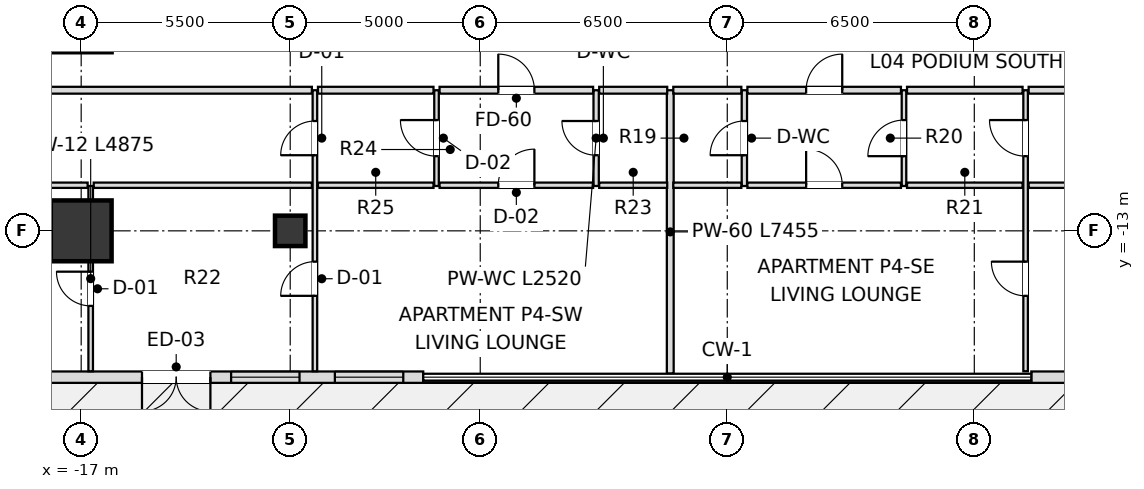
"""IFC4 building model, lengths in metres.
Left out: names, types, materials, properties, quantities, classifications, styles, units other than length and angle.
Written with IfcOpenShell. Run it as: python <this file> out.ifc"""

import sys

from ifc_helpers import new_model, si_unit, direction, frame, frame_2d, origin, origin_2d, place, context, subcontext, project, spatial, rectangle, extrude, element, fill, save


model = new_model("IFC4")
c1 = context("Model", 3, precision=1e-05, world=origin(), true_north=direction((0.0, 1.0)))
c2 = subcontext(c1, "Body", "Model", "MODEL_VIEW")
j1 = project(units=[si_unit("LENGTHUNIT", "METRE"), si_unit("PLANEANGLEUNIT", "RADIAN")], contexts=[c1])
p1 = place(None, origin())
s1 = spatial("IfcSite", under=j1, at=p1, CompositionType="ELEMENT")
p2 = place(p1, origin())
s2 = spatial("IfcBuilding", under=s1, at=p2, CompositionType="ELEMENT")
p3 = place(p2, frame((0.0, 0.0, 22.2)))
s3 = spatial("IfcBuildingStorey", under=s2, at=p3, CompositionType="ELEMENT", Elevation=22.2)
p4 = place(p3, frame((-17.0, -13.0, 0.0), z_axis=(0.0, 0.0, 1.0), x_axis=(1.0, 0.0, 0.0)))
e1 = element("IfcColumn", 1, at=p4, inside=s3, PredefinedType="USERDEFINED", context=c2, shape_type="SweptSolid", body=[
    extrude(rectangle(XDim=1.6, YDim=1.6, at=origin_2d()), origin(), (0.0, 0.0, 1.0), 5.4),
])
p5 = place(p3, frame((-11.5, -13.0, 0.0), z_axis=(0.0, 0.0, 1.0), x_axis=(1.0, 0.0, 0.0)))
e2 = element("IfcColumn", 2, at=p5, inside=s3, PredefinedType="COLUMN", context=c2, shape_type="SweptSolid", body=[
    extrude(rectangle(XDim=0.8, YDim=0.8, at=origin_2d()), origin(), (0.0, 0.0, 1.0), 5.4),
])
p6 = place(p3, frame((-8.0, -16.85, 0.0), z_axis=(0.0, 0.0, 1.0), x_axis=(-1.0, 0.0, 0.0)))
e3 = element("IfcWall", 3, at=p6, inside=s3, PredefinedType="SOLIDWALL", context=c2, shape_type="SweptSolid", body=[
    extrude(rectangle(XDim=14.85, YDim=0.3, at=frame_2d((7.425, 0.0))), origin(), (0.0, 0.0, 1.0), 4.356),
])
p7 = place(p6, frame((5.6, 0.0, 0.0)))
e4 = element("IfcOpeningElement", 4, at=p7, cuts=e3, PredefinedType="OPENING", context=c2, shape_type="SweptSolid", body=[
    extrude(rectangle(XDim=1.8, YDim=2.3, at=frame_2d((0.9, 1.15))), frame((0.0, 0.16, 0.0), z_axis=(0.0, -1.0, 0.0), x_axis=(1.0, 0.0, 0.0)), (0.0, 0.0, 1.0), 0.32),
])
p8 = place(p6, frame((0.525, 0.0, 0.72)))
e5 = element("IfcOpeningElement", 5, at=p8, cuts=e3, PredefinedType="OPENING", context=c2, shape_type="SweptSolid", body=[
    extrude(rectangle(XDim=1.8, YDim=1.68, at=frame_2d((0.9, 0.84))), frame((0.0, 0.16, 0.0), z_axis=(0.0, -1.0, 0.0), x_axis=(1.0, 0.0, 0.0)), (0.0, 0.0, 1.0), 0.32),
])
p9 = place(p6, frame((3.255, 0.0, 0.72)))
e6 = element("IfcOpeningElement", 6, at=p9, cuts=e3, PredefinedType="OPENING", context=c2, shape_type="SweptSolid", body=[
    extrude(rectangle(XDim=1.8, YDim=1.68, at=frame_2d((0.9, 0.84))), frame((0.0, 0.16, 0.0), z_axis=(0.0, -1.0, 0.0), x_axis=(1.0, 0.0, 0.0)), (0.0, 0.0, 1.0), 0.32),
])
p10 = place(p6, frame((10.535, 0.0, 0.8)))
e7 = element("IfcOpeningElement", 7, at=p10, cuts=e3, PredefinedType="OPENING", context=c2, shape_type="SweptSolid", body=[
    extrude(rectangle(XDim=2.4, YDim=2.2, at=frame_2d((1.2, 1.1))), frame((0.0, 0.16, 0.0), z_axis=(0.0, -1.0, 0.0), x_axis=(1.0, 0.0, 0.0)), (0.0, 0.0, 1.0), 0.32),
])
p11 = place(p3, frame((22.85, -16.85, 0.0), z_axis=(0.0, 0.0, 1.0), x_axis=(-1.0, 0.0, 0.0)))
e8 = element("IfcWall", 8, at=p11, inside=s3, PredefinedType="SOLIDWALL", context=c2, shape_type="SweptSolid", body=[
    extrude(rectangle(XDim=14.85, YDim=0.3, at=frame_2d((7.425, 0.0))), origin(), (0.0, 0.0, 1.0), 4.356),
])
p12 = place(p11, frame((1.425, 0.0, 0.8)))
e9 = element("IfcOpeningElement", 9, at=p12, cuts=e8, PredefinedType="OPENING", context=c2, shape_type="SweptSolid", body=[
    extrude(rectangle(XDim=2.4, YDim=2.2, at=frame_2d((1.2, 1.1))), frame((0.0, 0.16, 0.0), z_axis=(0.0, -1.0, 0.0), x_axis=(1.0, 0.0, 0.0)), (0.0, 0.0, 1.0), 0.32),
])
p13 = place(p11, frame((6.375, 0.0, 0.8)))
e10 = element("IfcOpeningElement", 10, at=p13, cuts=e8, PredefinedType="OPENING", context=c2, shape_type="SweptSolid", body=[
    extrude(rectangle(XDim=2.4, YDim=2.2, at=frame_2d((1.2, 1.1))), frame((0.0, 0.16, 0.0), z_axis=(0.0, -1.0, 0.0), x_axis=(1.0, 0.0, 0.0)), (0.0, 0.0, 1.0), 0.32),
])
p14 = place(p11, frame((11.25, 0.0, 0.8)))
e11 = element("IfcOpeningElement", 11, at=p14, cuts=e8, PredefinedType="OPENING", context=c2, shape_type="SweptSolid", body=[
    extrude(rectangle(XDim=2.4, YDim=2.2, at=frame_2d((1.2, 1.1))), frame((0.0, 0.16, 0.0), z_axis=(0.0, -1.0, 0.0), x_axis=(1.0, 0.0, 0.0)), (0.0, 0.0, 1.0), 0.32),
])
p15 = place(p3, frame((-16.75, -16.695, 0.0), z_axis=(0.0, 0.0, 1.0), x_axis=(0.0, 1.0, 0.0)))
e12 = element("IfcWall", 12, at=p15, inside=s3, PredefinedType="PARTITIONING", context=c2, shape_type="SweptSolid", body=[
    extrude(rectangle(XDim=4.875, YDim=0.12, at=frame_2d((2.438, 0.0))), origin(), (0.0, 0.0, 1.0), 2.985),
])
p16 = place(p15, frame((1.721, 0.0, 0.0)))
e13 = element("IfcOpeningElement", 13, at=p16, cuts=e12, PredefinedType="OPENING", context=c2, shape_type="SweptSolid", body=[
    extrude(rectangle(XDim=0.9, YDim=2.1, at=frame_2d((0.45, 1.05))), frame((0.0, 0.07, 0.0), z_axis=(0.0, -1.0, 0.0), x_axis=(1.0, 0.0, 0.0)), (0.0, 0.0, 1.0), 0.14),
])
p17 = place(p3, frame((-10.85, -16.695, 0.0), z_axis=(0.0, 0.0, 1.0), x_axis=(0.0, 1.0, 0.0)))
e14 = element("IfcWall", 14, at=p17, inside=s3, PredefinedType="PARTITIONING", context=c2, shape_type="SweptSolid", body=[
    extrude(rectangle(XDim=7.395, YDim=0.12, at=frame_2d((3.698, 0.0))), origin(), (0.0, 0.0, 1.0), 4.436),
])
p18 = place(p17, frame((5.685, 0.0, 0.0)))
e15 = element("IfcOpeningElement", 15, at=p18, cuts=e14, PredefinedType="OPENING", context=c2, shape_type="SweptSolid", body=[
    extrude(rectangle(XDim=0.9, YDim=2.1, at=frame_2d((0.45, 1.05))), frame((0.0, 0.07, 0.0), z_axis=(0.0, -1.0, 0.0), x_axis=(1.0, 0.0, 0.0)), (0.0, 0.0, 1.0), 0.14),
])
p19 = place(p17, frame((1.985, 0.0, 0.0)))
e16 = element("IfcOpeningElement", 16, at=p19, cuts=e14, PredefinedType="OPENING", context=c2, shape_type="SweptSolid", body=[
    extrude(rectangle(XDim=0.9, YDim=2.1, at=frame_2d((0.45, 1.05))), frame((0.0, 0.07, 0.0), z_axis=(0.0, -1.0, 0.0), x_axis=(1.0, 0.0, 0.0)), (0.0, 0.0, 1.0), 0.14),
])
p20 = place(p3, frame((-7.65, -11.82, 0.0), z_axis=(0.0, 0.0, 1.0), x_axis=(0.0, 1.0, 0.0)))
e17 = element("IfcWall", 17, at=p20, inside=s3, PredefinedType="PARTITIONING", context=c2, shape_type="SweptSolid", body=[
    extrude(rectangle(XDim=2.52, YDim=0.12, at=frame_2d((1.26, 0.0))), origin(), (0.0, 0.0, 1.0), 5.0),
])
p21 = place(p20, frame((0.785, 0.0, 0.0)))
e18 = element("IfcOpeningElement", 18, at=p21, cuts=e17, PredefinedType="OPENING", context=c2, shape_type="SweptSolid", body=[
    extrude(rectangle(XDim=0.95, YDim=2.1, at=frame_2d((0.475, 1.05))), frame((0.0, 0.07, 0.0), z_axis=(0.0, -1.0, 0.0), x_axis=(1.0, 0.0, 0.0)), (0.0, 0.0, 1.0), 0.14),
])
p22 = place(p3, frame((-3.45, -11.82, 0.0), z_axis=(0.0, 0.0, 1.0), x_axis=(0.0, 1.0, 0.0)))
e19 = element("IfcWall", 19, at=p22, inside=s3, PredefinedType="PARTITIONING", context=c2, shape_type="SweptSolid", body=[
    extrude(rectangle(XDim=2.52, YDim=0.14, at=frame_2d((1.26, 0.0))), origin(), (0.0, 0.0, 1.0), 5.0),
])
p23 = place(p22, frame((0.81, 0.0, 0.0)))
e20 = element("IfcOpeningElement", 20, at=p23, cuts=e19, PredefinedType="OPENING", context=c2, shape_type="SweptSolid", body=[
    extrude(rectangle(XDim=0.9, YDim=2.1, at=frame_2d((0.45, 1.05))), frame((0.0, 0.08, 0.0), z_axis=(0.0, -1.0, 0.0), x_axis=(1.0, 0.0, 0.0)), (0.0, 0.0, 1.0), 0.16),
])
p24 = place(p3, frame((-1.5, -16.755, 0.0), z_axis=(0.0, 0.0, 1.0), x_axis=(0.0, 1.0, 0.0)))
e21 = element("IfcWall", 21, at=p24, inside=s3, PredefinedType="PARTITIONING", context=c2, shape_type="SweptSolid", body=[
    extrude(rectangle(XDim=7.455, YDim=0.18, at=frame_2d((3.728, 0.0))), origin(), (0.0, 0.0, 1.0), 4.568),
])
p25 = place(p3, frame((0.45, -11.82, 0.0), z_axis=(0.0, 0.0, 1.0), x_axis=(0.0, 1.0, 0.0)))
e22 = element("IfcWall", 22, at=p25, inside=s3, PredefinedType="PARTITIONING", context=c2, shape_type="SweptSolid", body=[
    extrude(rectangle(XDim=2.52, YDim=0.14, at=frame_2d((1.26, 0.0))), origin(), (0.0, 0.0, 1.0), 5.0),
])
p26 = place(p25, frame((0.81, 0.0, 0.0)))
e23 = element("IfcOpeningElement", 23, at=p26, cuts=e22, PredefinedType="OPENING", context=c2, shape_type="SweptSolid", body=[
    extrude(rectangle(XDim=0.9, YDim=2.1, at=frame_2d((0.45, 1.05))), frame((0.0, 0.08, 0.0), z_axis=(0.0, -1.0, 0.0), x_axis=(1.0, 0.0, 0.0)), (0.0, 0.0, 1.0), 0.16),
])
p27 = place(p3, frame((4.65, -11.82, 0.0), z_axis=(0.0, 0.0, 1.0), x_axis=(0.0, 1.0, 0.0)))
e24 = element("IfcWall", 24, at=p27, inside=s3, PredefinedType="PARTITIONING", context=c2, shape_type="SweptSolid", body=[
    extrude(rectangle(XDim=2.52, YDim=0.12, at=frame_2d((1.26, 0.0))), origin(), (0.0, 0.0, 1.0), 5.0),
])
p28 = place(p27, frame((0.785, 0.0, 0.0)))
e25 = element("IfcOpeningElement", 25, at=p28, cuts=e24, PredefinedType="OPENING", context=c2, shape_type="SweptSolid", body=[
    extrude(rectangle(XDim=0.95, YDim=2.1, at=frame_2d((0.475, 1.05))), frame((0.0, 0.07, 0.0), z_axis=(0.0, -1.0, 0.0), x_axis=(1.0, 0.0, 0.0)), (0.0, 0.0, 1.0), 0.14),
])
p29 = place(p3, frame((7.85, -16.695, 0.0), z_axis=(0.0, 0.0, 1.0), x_axis=(0.0, 1.0, 0.0)))
e26 = element("IfcWall", 26, at=p29, inside=s3, PredefinedType="PARTITIONING", context=c2, shape_type="SweptSolid", body=[
    extrude(rectangle(XDim=7.395, YDim=0.12, at=frame_2d((3.698, 0.0))), origin(), (0.0, 0.0, 1.0), 4.436),
])
p30 = place(p29, frame((5.66, 0.0, 0.0)))
e27 = element("IfcOpeningElement", 27, at=p30, cuts=e26, PredefinedType="OPENING", context=c2, shape_type="SweptSolid", body=[
    extrude(rectangle(XDim=0.95, YDim=2.1, at=frame_2d((0.475, 1.05))), frame((0.0, 0.07, 0.0), z_axis=(0.0, -1.0, 0.0), x_axis=(1.0, 0.0, 0.0)), (0.0, 0.0, 1.0), 0.14),
])
p31 = place(p29, frame((1.985, 0.0, 0.0)))
e28 = element("IfcOpeningElement", 28, at=p31, cuts=e26, PredefinedType="OPENING", context=c2, shape_type="SweptSolid", body=[
    extrude(rectangle(XDim=0.9, YDim=2.1, at=frame_2d((0.45, 1.05))), frame((0.0, 0.07, 0.0), z_axis=(0.0, -1.0, 0.0), x_axis=(1.0, 0.0, 0.0)), (0.0, 0.0, 1.0), 0.14),
])
p32 = place(p3, frame((-22.695, -11.8, 0.0), z_axis=(0.0, 0.0, 1.0), x_axis=(1.0, 0.0, 0.0)))
e29 = element("IfcWall", 29, at=p32, inside=s3, PredefinedType="PARTITIONING", context=c2, shape_type="SweptSolid", body=[
    extrude(rectangle(XDim=5.865, YDim=0.14, at=frame_2d((2.933, 0.0))), origin(), (0.0, 0.0, 1.0), 4.356),
])
p33 = place(p3, frame((-16.67, -11.8, 0.0), z_axis=(0.0, 0.0, 1.0), x_axis=(1.0, 0.0, 0.0)))
e30 = element("IfcWall", 30, at=p33, inside=s3, PredefinedType="PARTITIONING", context=c2, shape_type="SweptSolid", body=[
    extrude(rectangle(XDim=5.74, YDim=0.14, at=frame_2d((2.87, 0.0))), origin(), (0.0, 0.0, 1.0), 5.0),
])
p34 = place(p3, frame((-10.77, -11.8, 0.0), z_axis=(0.0, 0.0, 1.0), x_axis=(1.0, 0.0, 0.0)))
e31 = element("IfcWall", 31, at=p34, inside=s3, PredefinedType="PARTITIONING", context=c2, shape_type="SweptSolid", body=[
    extrude(rectangle(XDim=3.04, YDim=0.14, at=frame_2d((1.52, 0.0))), origin(), (0.0, 0.0, 1.0), 5.0),
])
p35 = place(p3, frame((-7.57, -11.8, 0.0), z_axis=(0.0, 0.0, 1.0), x_axis=(1.0, 0.0, 0.0)))
e32 = element("IfcWall", 32, at=p35, inside=s3, PredefinedType="PARTITIONING", context=c2, shape_type="SweptSolid", body=[
    extrude(rectangle(XDim=4.04, YDim=0.14, at=frame_2d((2.02, 0.0))), origin(), (0.0, 0.0, 1.0), 4.436),
])
p36 = place(p35, frame((1.545, 0.0, 0.0)))
e33 = element("IfcOpeningElement", 33, at=p36, cuts=e32, PredefinedType="OPENING", context=c2, shape_type="SweptSolid", body=[
    extrude(rectangle(XDim=0.95, YDim=2.1, at=frame_2d((0.475, 1.05))), frame((0.0, 0.08, 0.0), z_axis=(0.0, -1.0, 0.0), x_axis=(1.0, 0.0, 0.0)), (0.0, 0.0, 1.0), 0.16),
])
for number, where, z_axis, x_axis in (
    (34, (-3.37, -11.8, 0.0), (0.0, 0.0, 1.0), (1.0, 0.0, 0.0)),
    (35, (-1.42, -11.8, 0.0), (0.0, 0.0, 1.0), (1.0, 0.0, 0.0)),
):
    element("IfcWall", number, at=place(p3, frame(where, z_axis=z_axis, x_axis=x_axis)), inside=s3, PredefinedType="PARTITIONING", context=c2, shape_type="SweptSolid", body=[
        extrude(rectangle(XDim=1.79, YDim=0.14, at=frame_2d((0.895, 0.0))), origin(), (0.0, 0.0, 1.0), 5.0),
    ])
p37 = place(p3, frame((0.53, -11.8, 0.0), z_axis=(0.0, 0.0, 1.0), x_axis=(1.0, 0.0, 0.0)))
e36 = element("IfcWall", 36, at=p37, inside=s3, PredefinedType="PARTITIONING", context=c2, shape_type="SweptSolid", body=[
    extrude(rectangle(XDim=4.04, YDim=0.14, at=frame_2d((2.02, 0.0))), origin(), (0.0, 0.0, 1.0), 5.0),
])
p38 = place(p37, frame((1.545, 0.0, 0.0)))
e37 = element("IfcOpeningElement", 37, at=p38, cuts=e36, PredefinedType="OPENING", context=c2, shape_type="SweptSolid", body=[
    extrude(rectangle(XDim=0.95, YDim=2.1, at=frame_2d((0.475, 1.05))), frame((0.0, 0.08, 0.0), z_axis=(0.0, -1.0, 0.0), x_axis=(1.0, 0.0, 0.0)), (0.0, 0.0, 1.0), 0.16),
])
p39 = place(p3, frame((4.73, -11.8, 0.0), z_axis=(0.0, 0.0, 1.0), x_axis=(1.0, 0.0, 0.0)))
e38 = element("IfcWall", 38, at=p39, inside=s3, PredefinedType="PARTITIONING", context=c2, shape_type="SweptSolid", body=[
    extrude(rectangle(XDim=3.04, YDim=0.14, at=frame_2d((1.52, 0.0))), origin(), (0.0, 0.0, 1.0), 4.436),
])
p40 = place(p3, frame((7.93, -11.8, 0.0), z_axis=(0.0, 0.0, 1.0), x_axis=(1.0, 0.0, 0.0)))
e39 = element("IfcWall", 39, at=p40, inside=s3, PredefinedType="PARTITIONING", context=c2, shape_type="SweptSolid", body=[
    extrude(rectangle(XDim=4.79, YDim=0.14, at=frame_2d((2.395, 0.0))), origin(), (0.0, 0.0, 1.0), 5.0),
])
p41 = place(p3, frame((-22.695, -9.3, 0.0), z_axis=(0.0, 0.0, 1.0), x_axis=(1.0, 0.0, 0.0)))
e40 = element("IfcWall", 40, at=p41, inside=s3, PredefinedType="PARTITIONING", context=c2, shape_type="SweptSolid", body=[
    extrude(rectangle(XDim=11.765, YDim=0.18, at=frame_2d((5.883, 0.0))), origin(), (0.0, 0.0, 1.0), 4.356),
])
p42 = place(p3, frame((-10.77, -9.3, 0.0), z_axis=(0.0, 0.0, 1.0), x_axis=(1.0, 0.0, 0.0)))
e41 = element("IfcWall", 41, at=p42, inside=s3, PredefinedType="PARTITIONING", context=c2, shape_type="SweptSolid", body=[
    extrude(rectangle(XDim=3.04, YDim=0.18, at=frame_2d((1.52, 0.0))), origin(), (0.0, 0.0, 1.0), 5.0),
])
p43 = place(p3, frame((-7.57, -9.3, 0.0), z_axis=(0.0, 0.0, 1.0), x_axis=(1.0, 0.0, 0.0)))
e42 = element("IfcWall", 42, at=p43, inside=s3, PredefinedType="PARTITIONING", context=c2, shape_type="SweptSolid", body=[
    extrude(rectangle(XDim=4.04, YDim=0.18, at=frame_2d((2.02, 0.0))), origin(), (0.0, 0.0, 1.0), 4.436),
])
p44 = place(p43, frame((1.545, 0.0, 0.0)))
e43 = element("IfcOpeningElement", 43, at=p44, cuts=e42, PredefinedType="OPENING", context=c2, shape_type="SweptSolid", body=[
    extrude(rectangle(XDim=0.95, YDim=2.15, at=frame_2d((0.475, 1.075))), frame((0.0, 0.1, 0.0), z_axis=(0.0, -1.0, 0.0), x_axis=(1.0, 0.0, 0.0)), (0.0, 0.0, 1.0), 0.2),
])
for number, where, z_axis, x_axis in (
    (44, (-3.37, -9.3, 0.0), (0.0, 0.0, 1.0), (1.0, 0.0, 0.0)),
    (45, (-1.42, -9.3, 0.0), (0.0, 0.0, 1.0), (1.0, 0.0, 0.0)),
):
    element("IfcWall", number, at=place(p3, frame(where, z_axis=z_axis, x_axis=x_axis)), inside=s3, PredefinedType="PARTITIONING", context=c2, shape_type="SweptSolid", body=[
        extrude(rectangle(XDim=1.79, YDim=0.18, at=frame_2d((0.895, 0.0))), origin(), (0.0, 0.0, 1.0), 5.0),
    ])
p45 = place(p3, frame((0.53, -9.3, 0.0), z_axis=(0.0, 0.0, 1.0), x_axis=(1.0, 0.0, 0.0)))
e46 = element("IfcWall", 46, at=p45, inside=s3, PredefinedType="PARTITIONING", context=c2, shape_type="SweptSolid", body=[
    extrude(rectangle(XDim=4.04, YDim=0.18, at=frame_2d((2.02, 0.0))), origin(), (0.0, 0.0, 1.0), 5.0),
])
p46 = place(p45, frame((1.545, 0.0, 0.0)))
e47 = element("IfcOpeningElement", 47, at=p46, cuts=e46, PredefinedType="OPENING", context=c2, shape_type="SweptSolid", body=[
    extrude(rectangle(XDim=0.95, YDim=2.15, at=frame_2d((0.475, 1.075))), frame((0.0, 0.1, 0.0), z_axis=(0.0, -1.0, 0.0), x_axis=(1.0, 0.0, 0.0)), (0.0, 0.0, 1.0), 0.2),
])
p47 = place(p3, frame((4.73, -9.3, 0.0), z_axis=(0.0, 0.0, 1.0), x_axis=(1.0, 0.0, 0.0)))
e48 = element("IfcWall", 48, at=p47, inside=s3, PredefinedType="PARTITIONING", context=c2, shape_type="SweptSolid", body=[
    extrude(rectangle(XDim=3.04, YDim=0.18, at=frame_2d((1.52, 0.0))), origin(), (0.0, 0.0, 1.0), 4.436),
])
p48 = place(p3, frame((7.93, -9.3, 0.0), z_axis=(0.0, 0.0, 1.0), x_axis=(1.0, 0.0, 0.0)))
e49 = element("IfcWall", 49, at=p48, inside=s3, PredefinedType="PARTITIONING", context=c2, shape_type="SweptSolid", body=[
    extrude(rectangle(XDim=14.765, YDim=0.18, at=frame_2d((7.383, 0.0))), origin(), (0.0, 0.0, 1.0), 4.356),
])
p49 = place(p7, origin())
e50 = element("IfcDoor", 50, at=p49, inside=s3, OperationType="DOUBLE_DOOR_SINGLE_SWING", PredefinedType="DOOR", context=c2, shape_type="SweptSolid", body=[
    extrude(rectangle(XDim=1.8, YDim=2.3, at=frame_2d((0.9, 1.15))), frame((0.0, 0.025, 0.0), z_axis=(0.0, -1.0, 0.0), x_axis=(1.0, 0.0, 0.0)), (0.0, 0.0, 1.0), 0.05),
])
fill(e4, e50)
p50 = place(p8, origin())
e51 = element("IfcWindow", 51, at=p50, inside=s3, PartitioningType="SINGLE_PANEL", PredefinedType="WINDOW", context=c2, shape_type="SweptSolid", body=[
    extrude(rectangle(XDim=1.8, YDim=1.68, at=frame_2d((0.9, 0.84))), frame((0.0, 0.03, 0.0), z_axis=(0.0, -1.0, 0.0), x_axis=(1.0, 0.0, 0.0)), (0.0, 0.0, 1.0), 0.06),
])
fill(e5, e51)
p51 = place(p9, origin())
e52 = element("IfcWindow", 52, at=p51, inside=s3, PartitioningType="SINGLE_PANEL", PredefinedType="WINDOW", context=c2, shape_type="SweptSolid", body=[
    extrude(rectangle(XDim=1.8, YDim=1.68, at=frame_2d((0.9, 0.84))), frame((0.0, 0.03, 0.0), z_axis=(0.0, -1.0, 0.0), x_axis=(1.0, 0.0, 0.0)), (0.0, 0.0, 1.0), 0.06),
])
fill(e6, e52)
p52 = place(p23, origin())
e53 = element("IfcDoor", 53, at=p52, inside=s3, OperationType="SINGLE_SWING_RIGHT", PredefinedType="DOOR", context=c2, shape_type="SweptSolid", body=[
    extrude(rectangle(XDim=0.9, YDim=2.1, at=frame_2d((0.45, 1.05))), frame((0.0, 0.025, 0.0), z_axis=(0.0, -1.0, 0.0), x_axis=(1.0, 0.0, 0.0)), (0.0, 0.0, 1.0), 0.05),
])
fill(e20, e53)
p53 = place(p44, origin())
e54 = element("IfcDoor", 54, at=p53, inside=s3, OperationType="SINGLE_SWING_LEFT", PredefinedType="DOOR", context=c2, shape_type="SweptSolid", body=[
    extrude(rectangle(XDim=0.95, YDim=2.15, at=frame_2d((0.475, 1.075))), frame((0.0, 0.025, 0.0), z_axis=(0.0, -1.0, 0.0), x_axis=(1.0, 0.0, 0.0)), (0.0, 0.0, 1.0), 0.05),
])
fill(e43, e54)
p54 = place(p21, origin())
e55 = element("IfcDoor", 55, at=p54, inside=s3, OperationType="SINGLE_SWING_RIGHT", PredefinedType="DOOR", context=c2, shape_type="SweptSolid", body=[
    extrude(rectangle(XDim=0.95, YDim=2.1, at=frame_2d((0.475, 1.05))), frame((0.0, 0.025, 0.0), z_axis=(0.0, -1.0, 0.0), x_axis=(1.0, 0.0, 0.0)), (0.0, 0.0, 1.0), 0.05),
])
fill(e18, e55)
p55 = place(p18, origin())
e56 = element("IfcDoor", 56, at=p55, inside=s3, OperationType="SINGLE_SWING_LEFT", PredefinedType="DOOR", context=c2, shape_type="SweptSolid", body=[
    extrude(rectangle(XDim=0.9, YDim=2.1, at=frame_2d((0.45, 1.05))), frame((0.0, 0.025, 0.0), z_axis=(0.0, -1.0, 0.0), x_axis=(1.0, 0.0, 0.0)), (0.0, 0.0, 1.0), 0.05),
])
fill(e15, e56)
p56 = place(p36, origin())
e57 = element("IfcDoor", 57, at=p56, inside=s3, OperationType="SINGLE_SWING_RIGHT", PredefinedType="DOOR", context=c2, shape_type="SweptSolid", body=[
    extrude(rectangle(XDim=0.95, YDim=2.1, at=frame_2d((0.475, 1.05))), frame((0.0, 0.025, 0.0), z_axis=(0.0, -1.0, 0.0), x_axis=(1.0, 0.0, 0.0)), (0.0, 0.0, 1.0), 0.05),
])
fill(e33, e57)
p57 = place(p19, origin())
e58 = element("IfcDoor", 58, at=p57, inside=s3, OperationType="SINGLE_SWING_LEFT", PredefinedType="DOOR", context=c2, shape_type="SweptSolid", body=[
    extrude(rectangle(XDim=0.9, YDim=2.1, at=frame_2d((0.45, 1.05))), frame((0.0, 0.025, 0.0), z_axis=(0.0, -1.0, 0.0), x_axis=(1.0, 0.0, 0.0)), (0.0, 0.0, 1.0), 0.05),
])
fill(e16, e58)
p58 = place(p16, origin())
e59 = element("IfcDoor", 59, at=p58, inside=s3, OperationType="SINGLE_SWING_RIGHT", PredefinedType="DOOR", context=c2, shape_type="SweptSolid", body=[
    extrude(rectangle(XDim=0.9, YDim=2.1, at=frame_2d((0.45, 1.05))), frame((0.0, 0.025, 0.0), z_axis=(0.0, -1.0, 0.0), x_axis=(1.0, 0.0, 0.0)), (0.0, 0.0, 1.0), 0.05),
])
fill(e13, e59)
p59 = place(p26, origin())
e60 = element("IfcDoor", 60, at=p59, inside=s3, OperationType="SINGLE_SWING_LEFT", PredefinedType="DOOR", context=c2, shape_type="SweptSolid", body=[
    extrude(rectangle(XDim=0.9, YDim=2.1, at=frame_2d((0.45, 1.05))), frame((0.0, 0.025, 0.0), z_axis=(0.0, -1.0, 0.0), x_axis=(1.0, 0.0, 0.0)), (0.0, 0.0, 1.0), 0.05),
])
fill(e23, e60)
p60 = place(p46, origin())
e61 = element("IfcDoor", 61, at=p60, inside=s3, OperationType="SINGLE_SWING_RIGHT", PredefinedType="DOOR", context=c2, shape_type="SweptSolid", body=[
    extrude(rectangle(XDim=0.95, YDim=2.15, at=frame_2d((0.475, 1.075))), frame((0.0, 0.025, 0.0), z_axis=(0.0, -1.0, 0.0), x_axis=(1.0, 0.0, 0.0)), (0.0, 0.0, 1.0), 0.05),
])
fill(e47, e61)
p61 = place(p28, origin())
e62 = element("IfcDoor", 62, at=p61, inside=s3, OperationType="SINGLE_SWING_LEFT", PredefinedType="DOOR", context=c2, shape_type="SweptSolid", body=[
    extrude(rectangle(XDim=0.95, YDim=2.1, at=frame_2d((0.475, 1.05))), frame((0.0, 0.025, 0.0), z_axis=(0.0, -1.0, 0.0), x_axis=(1.0, 0.0, 0.0)), (0.0, 0.0, 1.0), 0.05),
])
fill(e25, e62)
p62 = place(p30, origin())
e63 = element("IfcDoor", 63, at=p62, inside=s3, OperationType="SINGLE_SWING_RIGHT", PredefinedType="DOOR", context=c2, shape_type="SweptSolid", body=[
    extrude(rectangle(XDim=0.95, YDim=2.1, at=frame_2d((0.475, 1.05))), frame((0.0, 0.025, 0.0), z_axis=(0.0, -1.0, 0.0), x_axis=(1.0, 0.0, 0.0)), (0.0, 0.0, 1.0), 0.05),
])
fill(e27, e63)
p63 = place(p38, origin())
e64 = element("IfcDoor", 64, at=p63, inside=s3, OperationType="SINGLE_SWING_LEFT", PredefinedType="DOOR", context=c2, shape_type="SweptSolid", body=[
    extrude(rectangle(XDim=0.95, YDim=2.1, at=frame_2d((0.475, 1.05))), frame((0.0, 0.025, 0.0), z_axis=(0.0, -1.0, 0.0), x_axis=(1.0, 0.0, 0.0)), (0.0, 0.0, 1.0), 0.05),
])
fill(e37, e64)
p64 = place(p31, origin())
e65 = element("IfcDoor", 65, at=p64, inside=s3, OperationType="SINGLE_SWING_RIGHT", PredefinedType="DOOR", context=c2, shape_type="SweptSolid", body=[
    extrude(rectangle(XDim=0.9, YDim=2.1, at=frame_2d((0.45, 1.05))), frame((0.0, 0.025, 0.0), z_axis=(0.0, -1.0, 0.0), x_axis=(1.0, 0.0, 0.0)), (0.0, 0.0, 1.0), 0.05),
])
fill(e28, e65)
save(model, sys.argv[1])
